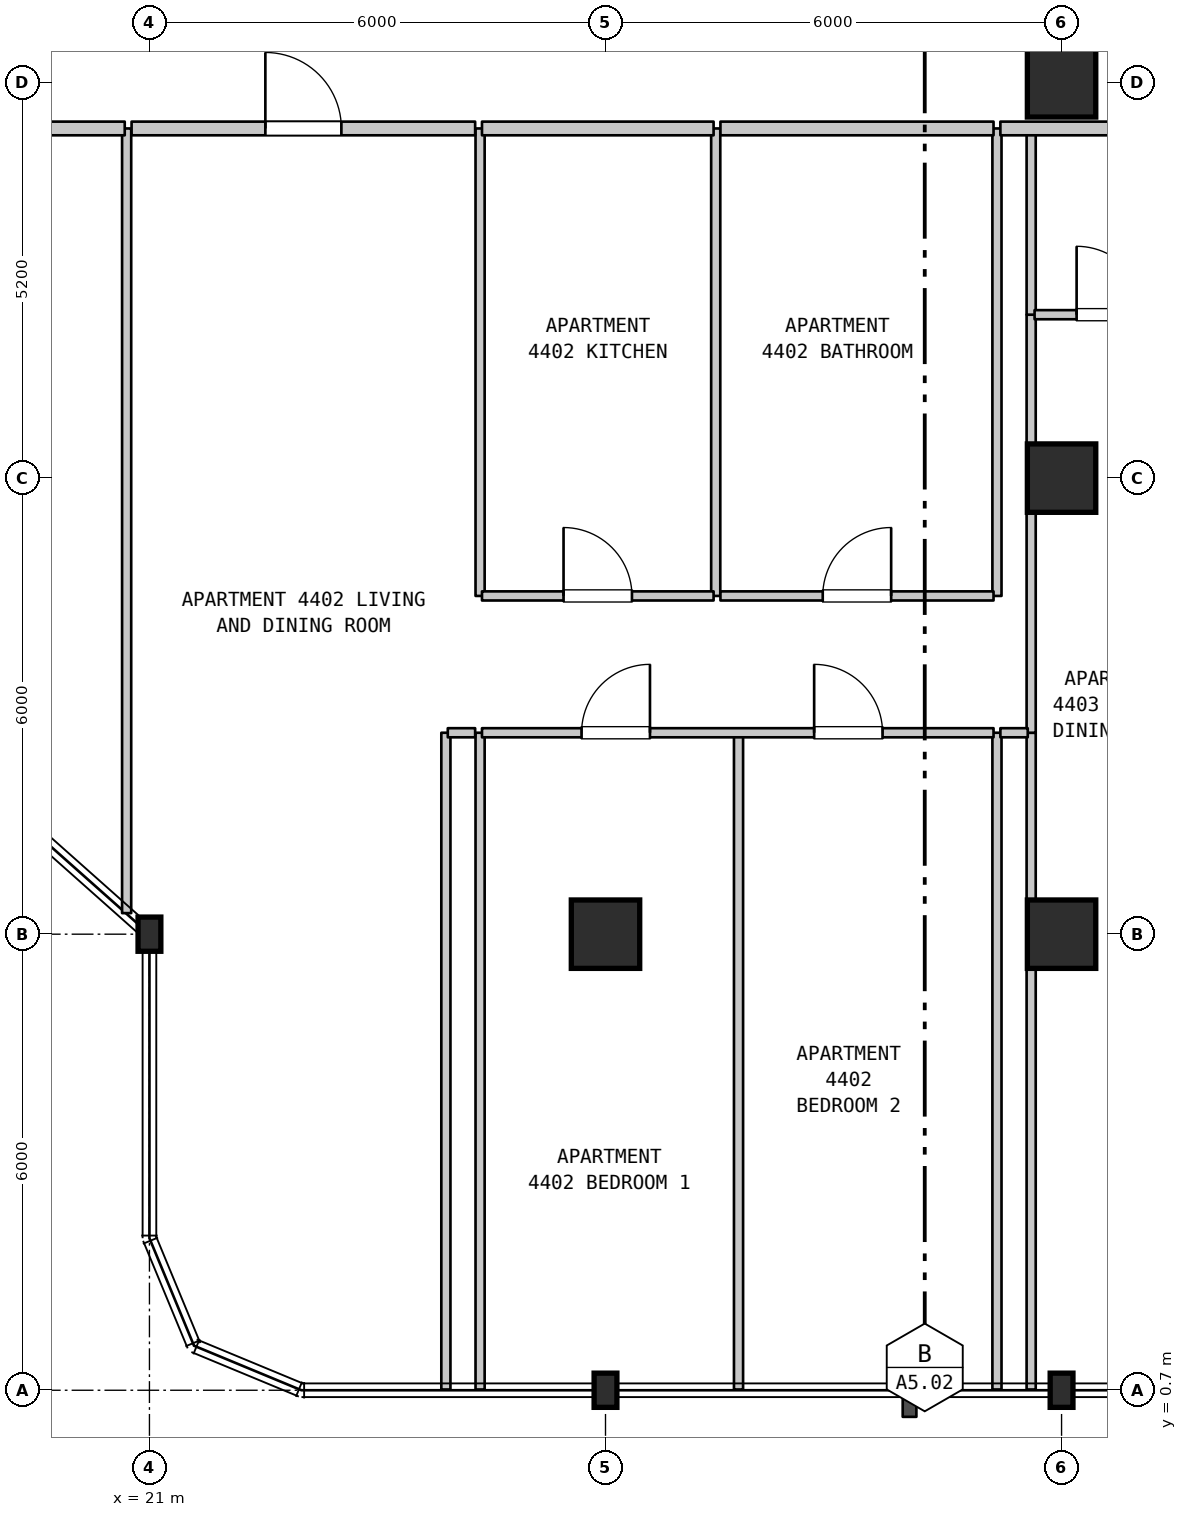
"""IFC4 building model, lengths in metres.
Left out: names, types, materials, properties, quantities, classifications, styles, units other than length and angle.
Written with IfcOpenShell. Run it as: python <this file> out.ifc"""

import sys

from ifc_helpers import new_model, si_unit, direction, frame, frame_2d, origin, origin_2d, place, context, subcontext, project, spatial, rectangle, i_section, extrude, element, fill, save


model = new_model("IFC4")
c1 = context("Model", 3, precision=1e-05, world=origin(), true_north=direction((0.0, 1.0)))
c2 = subcontext(c1, "Body", "Model", "MODEL_VIEW")
j1 = project(units=[si_unit("LENGTHUNIT", "METRE"), si_unit("PLANEANGLEUNIT", "RADIAN")], contexts=[c1])
p1 = place(None, origin())
s1 = spatial("IfcSite", under=j1, at=p1, CompositionType="ELEMENT")
p2 = place(p1, origin())
s2 = spatial("IfcBuilding", under=s1, at=p2, CompositionType="ELEMENT")
p3 = place(p2, frame((0.0, 0.0, 180.2)))
s3 = spatial("IfcBuildingStorey", under=s2, at=p3, CompositionType="ELEMENT", Elevation=180.2)
for number, where, z_axis, x_axis in (
    (1, (21.0, 6.7, 0.0), (0.0, 0.0, 1.0), (1.0, 0.0, 0.0)),
    (2, (27.0, 0.7, 0.0), (0.0, 0.0, 1.0), (1.0, 0.0, 0.0)),
):
    element("IfcColumn", number, at=place(p3, frame(where, z_axis=z_axis, x_axis=x_axis)), inside=s3, PredefinedType="COLUMN", context=c2, shape_type="SweptSolid", body=[
        extrude(i_section(OverallWidth=0.3, OverallDepth=0.45, WebThickness=0.014, FlangeThickness=0.026, FilletRadius=0.027, at=origin_2d()), origin(), (0.0, 0.0, 1.0), 3.7),
    ])
p4 = place(p3, frame((27.0, 6.7, 0.0), z_axis=(0.0, 0.0, 1.0), x_axis=(1.0, 0.0, 0.0)))
e3 = element("IfcColumn", 3, at=p4, inside=s3, PredefinedType="COLUMN", context=c2, shape_type="SweptSolid", body=[
    extrude(rectangle(XDim=0.9, YDim=0.9, at=origin_2d()), origin(), (0.0, 0.0, 1.0), 3.7),
])
p5 = place(p3, frame((33.0, 0.7, 0.0), z_axis=(0.0, 0.0, 1.0), x_axis=(1.0, 0.0, 0.0)))
e4 = element("IfcColumn", 4, at=p5, inside=s3, PredefinedType="COLUMN", context=c2, shape_type="SweptSolid", body=[
    extrude(i_section(OverallWidth=0.3, OverallDepth=0.45, WebThickness=0.014, FlangeThickness=0.026, FilletRadius=0.027, at=origin_2d()), origin(), (0.0, 0.0, 1.0), 3.7),
])
for number, where, z_axis, x_axis in (
    (5, (33.0, 6.7, 0.0), (0.0, 0.0, 1.0), (1.0, 0.0, 0.0)),
    (6, (33.0, 12.7, 0.0), (0.0, 0.0, 1.0), (1.0, 0.0, 0.0)),
    (7, (33.0, 17.9, 0.0), (0.0, 0.0, 1.0), (1.0, 0.0, 0.0)),
):
    element("IfcColumn", number, at=place(p3, frame(where, z_axis=z_axis, x_axis=x_axis)), inside=s3, PredefinedType="COLUMN", context=c2, shape_type="SweptSolid", body=[
        extrude(rectangle(XDim=0.9, YDim=0.9, at=origin_2d()), origin(), (0.0, 0.0, 1.0), 3.7),
    ])
p6 = place(p3, frame((20.7, 6.977, 0.0), z_axis=(0.0, 0.0, 1.0), x_axis=(0.0, 1.0, 0.0)))
e8 = element("IfcWall", 8, at=p6, inside=s3, PredefinedType="PARTITIONING", context=c2, shape_type="SweptSolid", body=[
    extrude(rectangle(XDim=10.323, YDim=0.12, at=frame_2d((5.162, 0.0))), origin(), (0.0, 0.0, 1.0), 3.38),
])
for number, where, z_axis, x_axis in (
    (9, (24.9, 0.71, 0.0), (0.0, 0.0, 1.0), (0.0, 1.0, 0.0)),
    (10, (25.35, 0.71, 0.0), (0.0, 0.0, 1.0), (0.0, 1.0, 0.0)),
):
    element("IfcWall", number, at=place(p3, frame(where, z_axis=z_axis, x_axis=x_axis)), inside=s3, PredefinedType="PARTITIONING", context=c2, shape_type="SweptSolid", body=[
        extrude(rectangle(XDim=8.64, YDim=0.12, at=frame_2d((4.32, 0.0))), origin(), (0.0, 0.0, 1.0), 3.38),
    ])
for number, where, z_axis, x_axis in (
    (11, (25.35, 11.15, 0.0), (0.0, 0.0, 1.0), (0.0, 1.0, 0.0)),
    (12, (28.45, 11.15, 0.0), (0.0, 0.0, 1.0), (0.0, 1.0, 0.0)),
):
    element("IfcWall", number, at=place(p3, frame(where, z_axis=z_axis, x_axis=x_axis)), inside=s3, PredefinedType="PARTITIONING", context=c2, shape_type="SweptSolid", body=[
        extrude(rectangle(XDim=6.15, YDim=0.12, at=frame_2d((3.075, 0.0))), origin(), (0.0, 0.0, 1.0), 3.38),
    ])
for number, where, z_axis, x_axis in (
    (13, (28.75, 0.71, 0.0), (0.0, 0.0, 1.0), (0.0, 1.0, 0.0)),
    (14, (32.15, 0.71, 0.0), (0.0, 0.0, 1.0), (0.0, 1.0, 0.0)),
):
    element("IfcWall", number, at=place(p3, frame(where, z_axis=z_axis, x_axis=x_axis)), inside=s3, PredefinedType="PARTITIONING", context=c2, shape_type="SweptSolid", body=[
        extrude(rectangle(XDim=8.64, YDim=0.12, at=frame_2d((4.32, 0.0))), origin(), (0.0, 0.0, 1.0), 3.38),
    ])
p7 = place(p3, frame((32.15, 11.15, 0.0), z_axis=(0.0, 0.0, 1.0), x_axis=(0.0, 1.0, 0.0)))
e15 = element("IfcWall", 15, at=p7, inside=s3, PredefinedType="PARTITIONING", context=c2, shape_type="SweptSolid", body=[
    extrude(rectangle(XDim=6.15, YDim=0.12, at=frame_2d((3.075, 0.0))), origin(), (0.0, 0.0, 1.0), 3.38),
])
p8 = place(p3, frame((32.6, 0.71, 0.0), z_axis=(0.0, 0.0, 1.0), x_axis=(0.0, 1.0, 0.0)))
e16 = element("IfcWall", 16, at=p8, inside=s3, PredefinedType="PARTITIONING", context=c2, shape_type="SweptSolid", body=[
    extrude(rectangle(XDim=8.64, YDim=0.12, at=frame_2d((4.32, 0.0))), origin(), (0.0, 0.0, 1.0), 3.38),
])
p9 = place(p3, frame((32.6, 9.35, 0.0), z_axis=(0.0, 0.0, 1.0), x_axis=(0.0, 1.0, 0.0)))
e17 = element("IfcWall", 17, at=p9, inside=s3, PredefinedType="PARTITIONING", context=c2, shape_type="SweptSolid", body=[
    extrude(rectangle(XDim=5.5, YDim=0.12, at=frame_2d((2.75, 0.0))), origin(), (0.0, 0.0, 1.0), 3.38),
])
p10 = place(p3, frame((32.6, 14.85, 0.0), z_axis=(0.0, 0.0, 1.0), x_axis=(0.0, 1.0, 0.0)))
e18 = element("IfcWall", 18, at=p10, inside=s3, PredefinedType="PARTITIONING", context=c2, shape_type="SweptSolid", body=[
    extrude(rectangle(XDim=2.45, YDim=0.12, at=frame_2d((1.225, 0.0))), origin(), (0.0, 0.0, 1.0), 3.38),
])
p11 = place(p3, frame((24.925, 9.35, 0.0), z_axis=(0.0, 0.0, 1.0), x_axis=(1.0, 0.0, 0.0)))
e19 = element("IfcWall", 19, at=p11, inside=s3, PredefinedType="PARTITIONING", context=c2, shape_type="SweptSolid", body=[
    extrude(rectangle(XDim=0.36, YDim=0.12, at=frame_2d((0.18, 0.0))), origin(), (0.0, 0.0, 1.0), 3.38),
])
p12 = place(p3, frame((25.375, 9.35, 0.0), z_axis=(0.0, 0.0, 1.0), x_axis=(1.0, 0.0, 0.0)))
e20 = element("IfcWall", 20, at=p12, inside=s3, PredefinedType="PARTITIONING", context=c2, shape_type="SweptSolid", body=[
    extrude(rectangle(XDim=6.73, YDim=0.12, at=frame_2d((3.365, 0.0))), origin(), (0.0, 0.0, 1.0), 3.38),
])
p13 = place(p12, frame((1.31, 0.0, 0.0)))
e21 = element("IfcOpeningElement", 21, at=p13, cuts=e20, PredefinedType="OPENING", context=c2, shape_type="SweptSolid", body=[
    extrude(rectangle(XDim=0.9, YDim=2.15, at=frame_2d((0.45, 1.075))), frame((0.0, 0.07, 0.0), z_axis=(0.0, -1.0, 0.0), x_axis=(1.0, 0.0, 0.0)), (0.0, 0.0, 1.0), 0.14),
])
p14 = place(p12, frame((4.37, 0.0, 0.0)))
e22 = element("IfcOpeningElement", 22, at=p14, cuts=e20, PredefinedType="OPENING", context=c2, shape_type="SweptSolid", body=[
    extrude(rectangle(XDim=0.9, YDim=2.15, at=frame_2d((0.45, 1.075))), frame((0.0, 0.07, 0.0), z_axis=(0.0, -1.0, 0.0), x_axis=(1.0, 0.0, 0.0)), (0.0, 0.0, 1.0), 0.14),
])
p15 = place(p3, frame((32.195, 9.35, 0.0), z_axis=(0.0, 0.0, 1.0), x_axis=(1.0, 0.0, 0.0)))
e23 = element("IfcWall", 23, at=p15, inside=s3, PredefinedType="PARTITIONING", context=c2, shape_type="SweptSolid", body=[
    extrude(rectangle(XDim=0.36, YDim=0.12, at=frame_2d((0.18, 0.0))), origin(), (0.0, 0.0, 1.0), 3.38),
])
p16 = place(p3, frame((25.375, 11.15, 0.0), z_axis=(0.0, 0.0, 1.0), x_axis=(1.0, 0.0, 0.0)))
e24 = element("IfcWall", 24, at=p16, inside=s3, PredefinedType="PARTITIONING", context=c2, shape_type="SweptSolid", body=[
    extrude(rectangle(XDim=3.047, YDim=0.12, at=frame_2d((1.523, 0.0))), origin(), (0.0, 0.0, 1.0), 3.38),
])
p17 = place(p16, frame((1.073, 0.0, 0.0)))
e25 = element("IfcOpeningElement", 25, at=p17, cuts=e24, PredefinedType="OPENING", context=c2, shape_type="SweptSolid", body=[
    extrude(rectangle(XDim=0.9, YDim=2.15, at=frame_2d((0.45, 1.075))), frame((0.0, 0.07, 0.0), z_axis=(0.0, -1.0, 0.0), x_axis=(1.0, 0.0, 0.0)), (0.0, 0.0, 1.0), 0.14),
])
p18 = place(p3, frame((28.512, 11.15, 0.0), z_axis=(0.0, 0.0, 1.0), x_axis=(1.0, 0.0, 0.0)))
e26 = element("IfcWall", 26, at=p18, inside=s3, PredefinedType="PARTITIONING", context=c2, shape_type="SweptSolid", body=[
    extrude(rectangle(XDim=3.593, YDim=0.12, at=frame_2d((1.796, 0.0))), origin(), (0.0, 0.0, 1.0), 3.38),
])
p19 = place(p18, frame((1.346, 0.0, 0.0)))
e27 = element("IfcOpeningElement", 27, at=p19, cuts=e26, PredefinedType="OPENING", context=c2, shape_type="SweptSolid", body=[
    extrude(rectangle(XDim=0.9, YDim=2.1, at=frame_2d((0.45, 1.05))), frame((0.0, 0.07, 0.0), z_axis=(0.0, -1.0, 0.0), x_axis=(1.0, 0.0, 0.0)), (0.0, 0.0, 1.0), 0.14),
])
p20 = place(p3, frame((32.645, 14.85, 0.0), z_axis=(0.0, 0.0, 1.0), x_axis=(1.0, 0.0, 0.0)))
e28 = element("IfcWall", 28, at=p20, inside=s3, PredefinedType="PARTITIONING", context=c2, shape_type="SweptSolid", body=[
    extrude(rectangle(XDim=2.16, YDim=0.12, at=frame_2d((1.08, 0.0))), origin(), (0.0, 0.0, 1.0), 3.38),
])
p21 = place(p20, frame((0.553, 0.0, 0.0)))
e29 = element("IfcOpeningElement", 29, at=p21, cuts=e28, PredefinedType="OPENING", context=c2, shape_type="SweptSolid", body=[
    extrude(rectangle(XDim=0.9, YDim=2.15, at=frame_2d((0.45, 1.075))), frame((0.0, 0.07, 0.0), z_axis=(0.0, -1.0, 0.0), x_axis=(1.0, 0.0, 0.0)), (0.0, 0.0, 1.0), 0.14),
])
p22 = place(p3, frame((18.815, 17.3, 0.0), z_axis=(0.0, 0.0, 1.0), x_axis=(1.0, 0.0, 0.0)))
e30 = element("IfcWall", 30, at=p22, inside=s3, PredefinedType="STANDARD", context=c2, shape_type="SweptSolid", body=[
    extrude(rectangle(XDim=1.86, YDim=0.18, at=frame_2d((0.93, 0.0))), origin(), (0.0, 0.0, 1.0), 3.38),
])
p23 = place(p3, frame((20.765, 17.3, 0.0), z_axis=(0.0, 0.0, 1.0), x_axis=(1.0, 0.0, 0.0)))
e31 = element("IfcWall", 31, at=p23, inside=s3, PredefinedType="STANDARD", context=c2, shape_type="SweptSolid", body=[
    extrude(rectangle(XDim=4.52, YDim=0.18, at=frame_2d((2.26, 0.0))), origin(), (0.0, 0.0, 1.0), 3.38),
])
p24 = place(p23, frame((1.76, 0.0, 0.0)))
e32 = element("IfcOpeningElement", 32, at=p24, cuts=e31, PredefinedType="OPENING", context=c2, shape_type="SweptSolid", body=[
    extrude(rectangle(XDim=1.0, YDim=2.15, at=frame_2d((0.5, 1.075))), frame((0.0, 0.1, 0.0), z_axis=(0.0, -1.0, 0.0), x_axis=(1.0, 0.0, 0.0)), (0.0, 0.0, 1.0), 0.2),
])
p25 = place(p3, frame((25.375, 17.3, 0.0), z_axis=(0.0, 0.0, 1.0), x_axis=(1.0, 0.0, 0.0)))
e33 = element("IfcWall", 33, at=p25, inside=s3, PredefinedType="STANDARD", context=c2, shape_type="SweptSolid", body=[
    extrude(rectangle(XDim=3.047, YDim=0.18, at=frame_2d((1.523, 0.0))), origin(), (0.0, 0.0, 1.0), 3.38),
])
p26 = place(p3, frame((28.512, 17.3, 0.0), z_axis=(0.0, 0.0, 1.0), x_axis=(1.0, 0.0, 0.0)))
e34 = element("IfcWall", 34, at=p26, inside=s3, PredefinedType="STANDARD", context=c2, shape_type="SweptSolid", body=[
    extrude(rectangle(XDim=3.593, YDim=0.18, at=frame_2d((1.796, 0.0))), origin(), (0.0, 0.0, 1.0), 3.38),
])
p27 = place(p3, frame((32.195, 17.3, 0.0), z_axis=(0.0, 0.0, 1.0), x_axis=(1.0, 0.0, 0.0)))
e35 = element("IfcWall", 35, at=p27, inside=s3, PredefinedType="STANDARD", context=c2, shape_type="SweptSolid", body=[
    extrude(rectangle(XDim=5.14, YDim=0.18, at=frame_2d((2.57, 0.0))), origin(), (0.0, 0.0, 1.0), 3.38),
])
p28 = place(p27, frame((2.198, 0.0, 0.0)))
e36 = element("IfcOpeningElement", 36, at=p28, cuts=e35, PredefinedType="OPENING", context=c2, shape_type="SweptSolid", body=[
    extrude(rectangle(XDim=1.0, YDim=2.15, at=frame_2d((0.5, 1.075))), frame((0.0, 0.1, 0.0), z_axis=(0.0, -1.0, 0.0), x_axis=(1.0, 0.0, 0.0)), (0.0, 0.0, 1.0), 0.2),
])
p29 = place(p13, origin())
e37 = element("IfcDoor", 37, at=p29, inside=s3, OperationType="SINGLE_SWING_RIGHT", PredefinedType="DOOR", context=c2, shape_type="SweptSolid", body=[
    extrude(rectangle(XDim=0.9, YDim=2.15, at=frame_2d((0.45, 1.075))), frame((0.0, 0.025, 0.0), z_axis=(0.0, -1.0, 0.0), x_axis=(1.0, 0.0, 0.0)), (0.0, 0.0, 1.0), 0.05),
])
fill(e21, e37)
p30 = place(p14, origin())
e38 = element("IfcDoor", 38, at=p30, inside=s3, OperationType="SINGLE_SWING_LEFT", PredefinedType="DOOR", context=c2, shape_type="SweptSolid", body=[
    extrude(rectangle(XDim=0.9, YDim=2.15, at=frame_2d((0.45, 1.075))), frame((0.0, 0.025, 0.0), z_axis=(0.0, -1.0, 0.0), x_axis=(1.0, 0.0, 0.0)), (0.0, 0.0, 1.0), 0.05),
])
fill(e22, e38)
p31 = place(p17, origin())
e39 = element("IfcDoor", 39, at=p31, inside=s3, OperationType="SINGLE_SWING_LEFT", PredefinedType="DOOR", context=c2, shape_type="SweptSolid", body=[
    extrude(rectangle(XDim=0.9, YDim=2.15, at=frame_2d((0.45, 1.075))), frame((0.0, 0.025, 0.0), z_axis=(0.0, -1.0, 0.0), x_axis=(1.0, 0.0, 0.0)), (0.0, 0.0, 1.0), 0.05),
])
fill(e25, e39)
p32 = place(p19, origin())
e40 = element("IfcDoor", 40, at=p32, inside=s3, OperationType="SINGLE_SWING_RIGHT", PredefinedType="DOOR", context=c2, shape_type="SweptSolid", body=[
    extrude(rectangle(XDim=0.9, YDim=2.1, at=frame_2d((0.45, 1.05))), frame((0.0, 0.025, 0.0), z_axis=(0.0, -1.0, 0.0), x_axis=(1.0, 0.0, 0.0)), (0.0, 0.0, 1.0), 0.05),
])
fill(e27, e40)
p33 = place(p21, origin())
e41 = element("IfcDoor", 41, at=p33, inside=s3, OperationType="SINGLE_SWING_LEFT", PredefinedType="DOOR", context=c2, shape_type="SweptSolid", body=[
    extrude(rectangle(XDim=0.9, YDim=2.15, at=frame_2d((0.45, 1.075))), frame((0.0, 0.025, 0.0), z_axis=(0.0, -1.0, 0.0), x_axis=(1.0, 0.0, 0.0)), (0.0, 0.0, 1.0), 0.05),
])
fill(e29, e41)
p34 = place(p24, origin())
e42 = element("IfcDoor", 42, at=p34, inside=s3, OperationType="SINGLE_SWING_LEFT", PredefinedType="DOOR", context=c2, shape_type="SweptSolid", body=[
    extrude(rectangle(XDim=1.0, YDim=2.15, at=frame_2d((0.5, 1.075))), frame((0.0, 0.025, 0.0), z_axis=(0.0, -1.0, 0.0), x_axis=(1.0, 0.0, 0.0)), (0.0, 0.0, 1.0), 0.05),
])
fill(e32, e42)
save(model, sys.argv[1])
